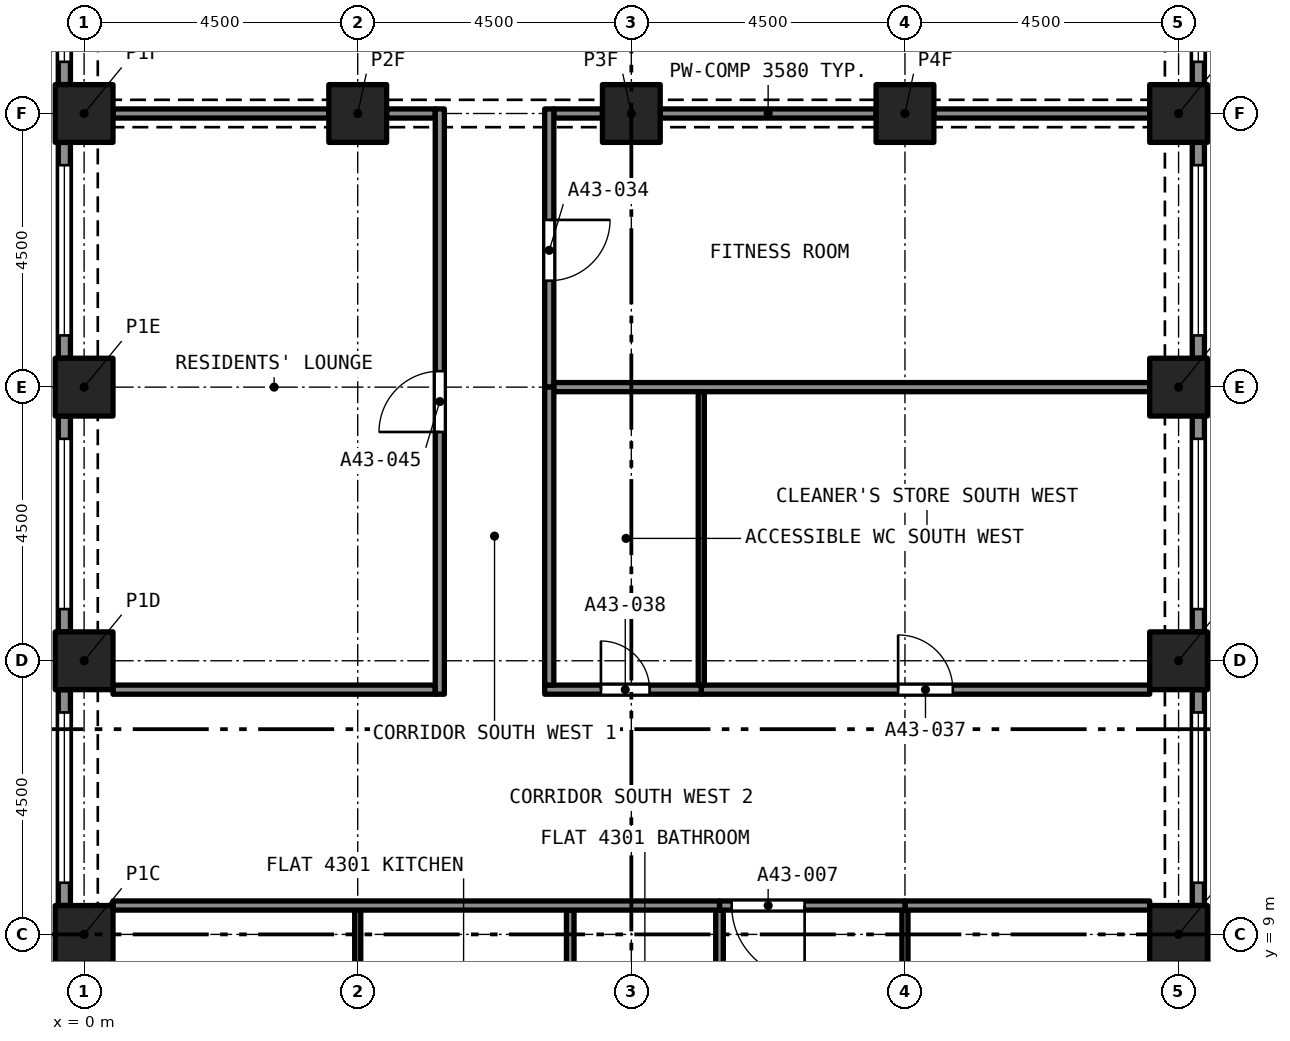
"""IFC4 building model, lengths in metres.
Left out: names, types, materials, properties, quantities, classifications, styles, units other than length and angle.
Written with IfcOpenShell. Run it as: python <this file> out.ifc"""

import sys

from ifc_helpers import new_model, si_unit, direction, frame, frame_2d, origin, origin_2d, place, context, subcontext, project, spatial, rectangle, extrude, element, fill, save


model = new_model("IFC4")
c1 = context("Model", 3, precision=1e-05, world=origin(), true_north=direction((0.0, 1.0)))
c2 = subcontext(c1, "Body", "Model", "MODEL_VIEW")
j1 = project(units=[si_unit("LENGTHUNIT", "METRE"), si_unit("PLANEANGLEUNIT", "RADIAN")], contexts=[c1])
p1 = place(None, origin())
s1 = spatial("IfcSite", under=j1, at=p1, CompositionType="ELEMENT")
p2 = place(p1, origin())
s2 = spatial("IfcBuilding", under=s1, at=p2, CompositionType="ELEMENT")
p3 = place(p2, frame((0.0, 0.0, 155.0)))
s3 = spatial("IfcBuildingStorey", under=s2, at=p3, CompositionType="ELEMENT", Elevation=155.0)
for number, where, z_axis, x_axis in (
    (1, (0.0, 9.0, 0.0), (0.0, 0.0, 1.0), (1.0, 0.0, 0.0)),
    (2, (18.0, 9.0, 0.0), (0.0, 0.0, 1.0), (1.0, 0.0, 0.0)),
    (3, (0.0, 13.5, 0.0), (0.0, 0.0, 1.0), (1.0, 0.0, 0.0)),
    (4, (18.0, 13.5, 0.0), (0.0, 0.0, 1.0), (1.0, 0.0, 0.0)),
    (5, (0.0, 18.0, 0.0), (0.0, 0.0, 1.0), (1.0, 0.0, 0.0)),
    (6, (18.0, 18.0, 0.0), (0.0, 0.0, 1.0), (1.0, 0.0, 0.0)),
    (7, (0.0, 22.5, 0.0), (0.0, 0.0, 1.0), (1.0, 0.0, 0.0)),
    (8, (4.5, 22.5, 0.0), (0.0, 0.0, 1.0), (1.0, 0.0, 0.0)),
    (9, (9.0, 22.5, 0.0), (0.0, 0.0, 1.0), (1.0, 0.0, 0.0)),
    (10, (13.5, 22.5, 0.0), (0.0, 0.0, 1.0), (1.0, 0.0, 0.0)),
    (11, (18.0, 22.5, 0.0), (0.0, 0.0, 1.0), (1.0, 0.0, 0.0)),
):
    element("IfcColumn", number, at=place(p3, frame(where, z_axis=z_axis, x_axis=x_axis)), inside=s3, PredefinedType="COLUMN", context=c2, shape_type="SweptSolid", body=[
        extrude(rectangle(XDim=0.95, YDim=0.95, at=origin_2d()), origin(), (0.0, 0.0, 1.0), 4.4),
    ])
p4 = place(p3, frame((-0.325, 22.975, 0.0), z_axis=(0.0, 0.0, 1.0), x_axis=(0.0, 1.0, 0.0)))
e12 = element("IfcWall", 12, at=p4, inside=s3, PredefinedType="SOLIDWALL", context=c2, shape_type="SweptSolid", body=[
    extrude(rectangle(XDim=3.55, YDim=0.2, at=frame_2d((1.775, 0.0))), origin(), (0.0, 0.0, 1.0), 4.4),
])
p5 = place(p4, frame((0.375, 0.0, 0.45)))
e13 = element("IfcOpeningElement", 13, at=p5, cuts=e12, PredefinedType="OPENING", context=c2, shape_type="SweptSolid", body=[
    extrude(rectangle(XDim=2.8, YDim=2.55, at=frame_2d((1.4, 1.275))), frame((0.0, 0.11, 0.0), z_axis=(0.0, -1.0, 0.0), x_axis=(1.0, 0.0, 0.0)), (0.0, 0.0, 1.0), 0.22),
])
p6 = place(p3, frame((-0.325, 18.475, 0.0), z_axis=(0.0, 0.0, 1.0), x_axis=(0.0, 1.0, 0.0)))
e14 = element("IfcWall", 14, at=p6, inside=s3, PredefinedType="SOLIDWALL", context=c2, shape_type="SweptSolid", body=[
    extrude(rectangle(XDim=3.55, YDim=0.2, at=frame_2d((1.775, 0.0))), origin(), (0.0, 0.0, 1.0), 4.4),
])
p7 = place(p6, frame((0.375, 0.0, 0.45)))
e15 = element("IfcOpeningElement", 15, at=p7, cuts=e14, PredefinedType="OPENING", context=c2, shape_type="SweptSolid", body=[
    extrude(rectangle(XDim=2.8, YDim=2.55, at=frame_2d((1.4, 1.275))), frame((0.0, 0.11, 0.0), z_axis=(0.0, -1.0, 0.0), x_axis=(1.0, 0.0, 0.0)), (0.0, 0.0, 1.0), 0.22),
])
p8 = place(p3, frame((-0.325, 13.975, 0.0), z_axis=(0.0, 0.0, 1.0), x_axis=(0.0, 1.0, 0.0)))
e16 = element("IfcWall", 16, at=p8, inside=s3, PredefinedType="SOLIDWALL", context=c2, shape_type="SweptSolid", body=[
    extrude(rectangle(XDim=3.55, YDim=0.2, at=frame_2d((1.775, 0.0))), origin(), (0.0, 0.0, 1.0), 4.4),
])
p9 = place(p8, frame((0.375, 0.0, 0.45)))
e17 = element("IfcOpeningElement", 17, at=p9, cuts=e16, PredefinedType="OPENING", context=c2, shape_type="SweptSolid", body=[
    extrude(rectangle(XDim=2.8, YDim=2.55, at=frame_2d((1.4, 1.275))), frame((0.0, 0.11, 0.0), z_axis=(0.0, -1.0, 0.0), x_axis=(1.0, 0.0, 0.0)), (0.0, 0.0, 1.0), 0.22),
])
p10 = place(p3, frame((-0.325, 9.475, 0.0), z_axis=(0.0, 0.0, 1.0), x_axis=(0.0, 1.0, 0.0)))
e18 = element("IfcWall", 18, at=p10, inside=s3, PredefinedType="SOLIDWALL", context=c2, shape_type="SweptSolid", body=[
    extrude(rectangle(XDim=3.55, YDim=0.2, at=frame_2d((1.775, 0.0))), origin(), (0.0, 0.0, 1.0), 4.4),
])
p11 = place(p10, frame((0.375, 0.0, 0.45)))
e19 = element("IfcOpeningElement", 19, at=p11, cuts=e18, PredefinedType="OPENING", context=c2, shape_type="SweptSolid", body=[
    extrude(rectangle(XDim=2.8, YDim=2.55, at=frame_2d((1.4, 1.275))), frame((0.0, 0.11, 0.0), z_axis=(0.0, -1.0, 0.0), x_axis=(1.0, 0.0, 0.0)), (0.0, 0.0, 1.0), 0.22),
])
p12 = place(p3, frame((18.325, 13.025, 0.0), z_axis=(0.0, 0.0, 1.0), x_axis=(0.0, -1.0, 0.0)))
e20 = element("IfcWall", 20, at=p12, inside=s3, PredefinedType="SOLIDWALL", context=c2, shape_type="SweptSolid", body=[
    extrude(rectangle(XDim=3.55, YDim=0.2, at=frame_2d((1.775, 0.0))), origin(), (0.0, 0.0, 1.0), 4.4),
])
p13 = place(p12, frame((0.375, 0.0, 0.45)))
e21 = element("IfcOpeningElement", 21, at=p13, cuts=e20, PredefinedType="OPENING", context=c2, shape_type="SweptSolid", body=[
    extrude(rectangle(XDim=2.8, YDim=2.55, at=frame_2d((1.4, 1.275))), frame((0.0, 0.11, 0.0), z_axis=(0.0, -1.0, 0.0), x_axis=(1.0, 0.0, 0.0)), (0.0, 0.0, 1.0), 0.22),
])
p14 = place(p3, frame((18.325, 17.525, 0.0), z_axis=(0.0, 0.0, 1.0), x_axis=(0.0, -1.0, 0.0)))
e22 = element("IfcWall", 22, at=p14, inside=s3, PredefinedType="SOLIDWALL", context=c2, shape_type="SweptSolid", body=[
    extrude(rectangle(XDim=3.55, YDim=0.2, at=frame_2d((1.775, 0.0))), origin(), (0.0, 0.0, 1.0), 4.4),
])
p15 = place(p14, frame((0.375, 0.0, 0.45)))
e23 = element("IfcOpeningElement", 23, at=p15, cuts=e22, PredefinedType="OPENING", context=c2, shape_type="SweptSolid", body=[
    extrude(rectangle(XDim=2.8, YDim=2.55, at=frame_2d((1.4, 1.275))), frame((0.0, 0.11, 0.0), z_axis=(0.0, -1.0, 0.0), x_axis=(1.0, 0.0, 0.0)), (0.0, 0.0, 1.0), 0.22),
])
p16 = place(p3, frame((18.325, 22.025, 0.0), z_axis=(0.0, 0.0, 1.0), x_axis=(0.0, -1.0, 0.0)))
e24 = element("IfcWall", 24, at=p16, inside=s3, PredefinedType="SOLIDWALL", context=c2, shape_type="SweptSolid", body=[
    extrude(rectangle(XDim=3.55, YDim=0.2, at=frame_2d((1.775, 0.0))), origin(), (0.0, 0.0, 1.0), 4.4),
])
p17 = place(p16, frame((0.375, 0.0, 0.45)))
e25 = element("IfcOpeningElement", 25, at=p17, cuts=e24, PredefinedType="OPENING", context=c2, shape_type="SweptSolid", body=[
    extrude(rectangle(XDim=2.8, YDim=2.55, at=frame_2d((1.4, 1.275))), frame((0.0, 0.11, 0.0), z_axis=(0.0, -1.0, 0.0), x_axis=(1.0, 0.0, 0.0)), (0.0, 0.0, 1.0), 0.22),
])
p18 = place(p3, frame((18.325, 26.525, 0.0), z_axis=(0.0, 0.0, 1.0), x_axis=(0.0, -1.0, 0.0)))
e26 = element("IfcWall", 26, at=p18, inside=s3, PredefinedType="SOLIDWALL", context=c2, shape_type="SweptSolid", body=[
    extrude(rectangle(XDim=3.55, YDim=0.2, at=frame_2d((1.775, 0.0))), origin(), (0.0, 0.0, 1.0), 4.4),
])
p19 = place(p18, frame((0.375, 0.0, 0.45)))
e27 = element("IfcOpeningElement", 27, at=p19, cuts=e26, PredefinedType="OPENING", context=c2, shape_type="SweptSolid", body=[
    extrude(rectangle(XDim=2.8, YDim=2.55, at=frame_2d((1.4, 1.275))), frame((0.0, 0.11, 0.0), z_axis=(0.0, -1.0, 0.0), x_axis=(1.0, 0.0, 0.0)), (0.0, 0.0, 1.0), 0.22),
])
for number, where, z_axis, x_axis in (
    (28, (10.45, 5.238, 0.0), (0.0, 0.0, 1.0), (0.0, 1.0, 0.0)),
    (29, (7.995, 5.238, 0.0), (0.0, 0.0, 1.0), (0.0, 1.0, 0.0)),
):
    element("IfcWall", number, at=place(p3, frame(where, z_axis=z_axis, x_axis=x_axis)), inside=s3, PredefinedType="PARTITIONING", context=c2, shape_type="SweptSolid", body=[
        extrude(rectangle(XDim=4.162, YDim=0.125, at=frame_2d((2.081, 0.0))), origin(), (0.0, 0.0, 1.0), 4.1),
    ])
p20 = place(p3, frame((13.5, 9.4, 0.0), z_axis=(0.0, 0.0, 1.0), x_axis=(0.0, -1.0, 0.0)))
e30 = element("IfcWall", 30, at=p20, inside=s3, PredefinedType="PARTITIONING", context=c2, shape_type="SweptSolid", body=[
    extrude(rectangle(XDim=5.565, YDim=0.1, at=frame_2d((2.782, 0.0))), origin(), (0.0, 0.0, 1.0), 4.1),
])
p21 = place(p20, frame((4.445, 0.0, 0.0)))
e31 = element("IfcOpeningElement", 31, at=p21, cuts=e30, PredefinedType="OPENING", context=c2, shape_type="SweptSolid", body=[
    extrude(rectangle(XDim=0.9, YDim=2.1, at=frame_2d((0.45, 1.05))), frame((0.0, 0.06, 0.0), z_axis=(0.0, -1.0, 0.0), x_axis=(1.0, 0.0, 0.0)), (0.0, 0.0, 1.0), 0.12),
])
p22 = place(p3, frame((13.5, 9.475, 0.0), z_axis=(0.0, 0.0, 1.0), x_axis=(1.0, 0.0, 0.0)))
e32 = element("IfcWall", 32, at=p22, inside=s3, PredefinedType="PARTITIONING", context=c2, shape_type="SweptSolid", body=[
    extrude(rectangle(XDim=4.025, YDim=0.15, at=frame_2d((2.012, 0.0))), origin(), (0.0, 0.0, 1.0), 4.1),
])
p23 = place(p3, frame((13.5, 9.475, 0.0), z_axis=(0.0, 0.0, 1.0), x_axis=(-1.0, 0.0, 0.0)))
e33 = element("IfcWall", 33, at=p23, inside=s3, PredefinedType="PARTITIONING", context=c2, shape_type="SweptSolid", body=[
    extrude(rectangle(XDim=3.05, YDim=0.15, at=frame_2d((1.525, 0.0))), origin(), (0.0, 0.0, 1.0), 4.1),
])
p24 = place(p23, frame((1.65, 0.0, 0.0)))
e34 = element("IfcOpeningElement", 34, at=p24, cuts=e33, PredefinedType="OPENING", context=c2, shape_type="SweptSolid", body=[
    extrude(rectangle(XDim=1.2, YDim=2.4, at=frame_2d((0.6, 1.2))), frame((0.0, 0.085, 0.0), z_axis=(0.0, -1.0, 0.0), x_axis=(1.0, 0.0, 0.0)), (0.0, 0.0, 1.0), 0.17),
])
p25 = place(p3, frame((4.5, 5.175, 0.0), z_axis=(0.0, 0.0, 1.0), x_axis=(0.0, 1.0, 0.0)))
e35 = element("IfcWall", 35, at=p25, inside=s3, PredefinedType="PARTITIONING", context=c2, shape_type="SweptSolid", body=[
    extrude(rectangle(XDim=4.225, YDim=0.1, at=frame_2d((2.112, 0.0))), origin(), (0.0, 0.0, 1.0), 4.1),
])
p26 = place(p3, frame((0.475, 9.475, 0.0), z_axis=(0.0, 0.0, 1.0), x_axis=(1.0, 0.0, 0.0)))
e36 = element("IfcWall", 36, at=p26, inside=s3, PredefinedType="PARTITIONING", context=c2, shape_type="SweptSolid", body=[
    extrude(rectangle(XDim=9.975, YDim=0.15, at=frame_2d((4.987, 0.0))), origin(), (0.0, 0.0, 1.0), 4.1),
])
p27 = place(p3, frame((7.725, 22.5, 0.0), z_axis=(0.0, 0.0, 1.0), x_axis=(1.0, 0.0, 0.0)))
e37 = element("IfcWall", 37, at=p27, inside=s3, PredefinedType="PARTITIONING", context=c2, shape_type="SweptSolid", body=[
    extrude(rectangle(XDim=0.8, YDim=0.15, at=frame_2d((0.4, 0.0))), origin(), (0.0, 0.0, 1.0), 3.58),
])
for number, where, z_axis, x_axis in (
    (38, (9.475, 22.5, 0.0), (0.0, 0.0, 1.0), (1.0, 0.0, 0.0)),
    (39, (13.975, 22.5, 0.0), (0.0, 0.0, 1.0), (1.0, 0.0, 0.0)),
):
    element("IfcWall", number, at=place(p3, frame(where, z_axis=z_axis, x_axis=x_axis)), inside=s3, PredefinedType="PARTITIONING", context=c2, shape_type="SweptSolid", body=[
        extrude(rectangle(XDim=3.55, YDim=0.15, at=frame_2d((1.775, 0.0))), origin(), (0.0, 0.0, 1.0), 3.58),
    ])
p28 = place(p3, frame((7.65, 22.575, 0.0), z_axis=(0.0, 0.0, 1.0), x_axis=(0.0, -1.0, 0.0)))
e40 = element("IfcWall", 40, at=p28, inside=s3, PredefinedType="PARTITIONING", context=c2, shape_type="SweptSolid", body=[
    extrude(rectangle(XDim=4.575, YDim=0.15, at=frame_2d((2.288, 0.0))), origin(), (0.0, 0.0, 1.0), 4.1),
])
p29 = place(p28, frame((1.825, 0.0, 0.0)))
e41 = element("IfcOpeningElement", 41, at=p29, cuts=e40, PredefinedType="OPENING", context=c2, shape_type="SweptSolid", body=[
    extrude(rectangle(XDim=1.0, YDim=2.1, at=frame_2d((0.5, 1.05))), frame((0.0, 0.085, 0.0), z_axis=(0.0, -1.0, 0.0), x_axis=(1.0, 0.0, 0.0)), (0.0, 0.0, 1.0), 0.17),
])
p30 = place(p3, frame((7.725, 18.0, 0.0), z_axis=(0.0, 0.0, 1.0), x_axis=(1.0, 0.0, 0.0)))
e42 = element("IfcWall", 42, at=p30, inside=s3, PredefinedType="PARTITIONING", context=c2, shape_type="SweptSolid", body=[
    extrude(rectangle(XDim=9.8, YDim=0.15, at=frame_2d((4.9, 0.0))), origin(), (0.0, 0.0, 1.0), 4.1),
])
p31 = place(p3, frame((10.15, 13.025, 0.0), z_axis=(0.0, 0.0, 1.0), x_axis=(1.0, 0.0, 0.0)))
e43 = element("IfcWall", 43, at=p31, inside=s3, PredefinedType="PARTITIONING", context=c2, shape_type="SweptSolid", body=[
    extrude(rectangle(XDim=7.375, YDim=0.15, at=frame_2d((3.688, 0.0))), origin(), (0.0, 0.0, 1.0), 4.1),
])
p32 = place(p31, frame((3.238, 0.0, 0.0)))
e44 = element("IfcOpeningElement", 44, at=p32, cuts=e43, PredefinedType="OPENING", context=c2, shape_type="SweptSolid", body=[
    extrude(rectangle(XDim=0.9, YDim=2.1, at=frame_2d((0.45, 1.05))), frame((0.0, 0.085, 0.0), z_axis=(0.0, -1.0, 0.0), x_axis=(1.0, 0.0, 0.0)), (0.0, 0.0, 1.0), 0.17),
])
p33 = place(p3, frame((7.575, 13.025, 0.0), z_axis=(0.0, 0.0, 1.0), x_axis=(1.0, 0.0, 0.0)))
e45 = element("IfcWall", 45, at=p33, inside=s3, PredefinedType="PARTITIONING", context=c2, shape_type="SweptSolid", body=[
    extrude(rectangle(XDim=2.575, YDim=0.15, at=frame_2d((1.288, 0.0))), origin(), (0.0, 0.0, 1.0), 4.1),
])
p34 = place(p33, frame((0.925, 0.0, 0.0)))
e46 = element("IfcOpeningElement", 46, at=p34, cuts=e45, PredefinedType="OPENING", context=c2, shape_type="SweptSolid", body=[
    extrude(rectangle(XDim=0.8, YDim=2.1, at=frame_2d((0.4, 1.05))), frame((0.0, 0.085, 0.0), z_axis=(0.0, -1.0, 0.0), x_axis=(1.0, 0.0, 0.0)), (0.0, 0.0, 1.0), 0.17),
])
p35 = place(p3, frame((0.475, 13.025, 0.0), z_axis=(0.0, 0.0, 1.0), x_axis=(1.0, 0.0, 0.0)))
e47 = element("IfcWall", 47, at=p35, inside=s3, PredefinedType="PARTITIONING", context=c2, shape_type="SweptSolid", body=[
    extrude(rectangle(XDim=5.3, YDim=0.15, at=frame_2d((2.65, 0.0))), origin(), (0.0, 0.0, 1.0), 4.1),
])
p36 = place(p3, frame((4.975, 22.5, 0.0), z_axis=(0.0, 0.0, 1.0), x_axis=(1.0, 0.0, 0.0)))
e48 = element("IfcWall", 48, at=p36, inside=s3, PredefinedType="PARTITIONING", context=c2, shape_type="SweptSolid", body=[
    extrude(rectangle(XDim=0.8, YDim=0.15, at=frame_2d((0.4, 0.0))), origin(), (0.0, 0.0, 1.0), 3.58),
])
p37 = place(p3, frame((0.475, 22.5, 0.0), z_axis=(0.0, 0.0, 1.0), x_axis=(1.0, 0.0, 0.0)))
e49 = element("IfcWall", 49, at=p37, inside=s3, PredefinedType="PARTITIONING", context=c2, shape_type="SweptSolid", body=[
    extrude(rectangle(XDim=3.55, YDim=0.15, at=frame_2d((1.775, 0.0))), origin(), (0.0, 0.0, 1.0), 3.58),
])
p38 = place(p3, frame((7.65, 13.1, 0.0), z_axis=(0.0, 0.0, 1.0), x_axis=(0.0, 1.0, 0.0)))
e50 = element("IfcWall", 50, at=p38, inside=s3, PredefinedType="PARTITIONING", context=c2, shape_type="SweptSolid", body=[
    extrude(rectangle(XDim=4.9, YDim=0.15, at=frame_2d((2.45, 0.0))), origin(), (0.0, 0.0, 1.0), 4.1),
])
p39 = place(p3, frame((5.85, 12.95, 0.0), z_axis=(0.0, 0.0, 1.0), x_axis=(0.0, 1.0, 0.0)))
e51 = element("IfcWall", 51, at=p39, inside=s3, PredefinedType="PARTITIONING", context=c2, shape_type="SweptSolid", body=[
    extrude(rectangle(XDim=9.625, YDim=0.15, at=frame_2d((4.812, 0.0))), origin(), (0.0, 0.0, 1.0), 4.1),
])
p40 = place(p39, frame((4.312, 0.0, 0.0)))
e52 = element("IfcOpeningElement", 52, at=p40, cuts=e51, PredefinedType="OPENING", context=c2, shape_type="SweptSolid", body=[
    extrude(rectangle(XDim=1.0, YDim=2.1, at=frame_2d((0.5, 1.05))), frame((0.0, 0.085, 0.0), z_axis=(0.0, -1.0, 0.0), x_axis=(1.0, 0.0, 0.0)), (0.0, 0.0, 1.0), 0.17),
])
p41 = place(p3, frame((10.15, 13.1, 0.0), z_axis=(0.0, 0.0, 1.0), x_axis=(0.0, 1.0, 0.0)))
e53 = element("IfcWall", 53, at=p41, inside=s3, PredefinedType="PARTITIONING", context=c2, shape_type="SweptSolid", body=[
    extrude(rectangle(XDim=4.825, YDim=0.1, at=frame_2d((2.413, 0.0))), origin(), (0.0, 0.0, 1.0), 4.1),
])
p42 = place(p5, origin())
e54 = element("IfcWindow", 54, at=p42, inside=s3, PartitioningType="SINGLE_PANEL", PredefinedType="WINDOW", context=c2, shape_type="SweptSolid", body=[
    extrude(rectangle(XDim=2.8, YDim=2.55, at=frame_2d((1.4, 1.275))), frame((0.0, 0.03, 0.0), z_axis=(0.0, -1.0, 0.0), x_axis=(1.0, 0.0, 0.0)), (0.0, 0.0, 1.0), 0.06),
])
fill(e13, e54)
p43 = place(p7, origin())
e55 = element("IfcWindow", 55, at=p43, inside=s3, PartitioningType="SINGLE_PANEL", PredefinedType="WINDOW", context=c2, shape_type="SweptSolid", body=[
    extrude(rectangle(XDim=2.8, YDim=2.55, at=frame_2d((1.4, 1.275))), frame((0.0, 0.03, 0.0), z_axis=(0.0, -1.0, 0.0), x_axis=(1.0, 0.0, 0.0)), (0.0, 0.0, 1.0), 0.06),
])
fill(e15, e55)
p44 = place(p9, origin())
e56 = element("IfcWindow", 56, at=p44, inside=s3, PartitioningType="SINGLE_PANEL", PredefinedType="WINDOW", context=c2, shape_type="SweptSolid", body=[
    extrude(rectangle(XDim=2.8, YDim=2.55, at=frame_2d((1.4, 1.275))), frame((0.0, 0.03, 0.0), z_axis=(0.0, -1.0, 0.0), x_axis=(1.0, 0.0, 0.0)), (0.0, 0.0, 1.0), 0.06),
])
fill(e17, e56)
p45 = place(p11, origin())
e57 = element("IfcWindow", 57, at=p45, inside=s3, PartitioningType="SINGLE_PANEL", PredefinedType="WINDOW", context=c2, shape_type="SweptSolid", body=[
    extrude(rectangle(XDim=2.8, YDim=2.55, at=frame_2d((1.4, 1.275))), frame((0.0, 0.03, 0.0), z_axis=(0.0, -1.0, 0.0), x_axis=(1.0, 0.0, 0.0)), (0.0, 0.0, 1.0), 0.06),
])
fill(e19, e57)
p46 = place(p13, origin())
e58 = element("IfcWindow", 58, at=p46, inside=s3, PartitioningType="SINGLE_PANEL", PredefinedType="WINDOW", context=c2, shape_type="SweptSolid", body=[
    extrude(rectangle(XDim=2.8, YDim=2.55, at=frame_2d((1.4, 1.275))), frame((0.0, 0.03, 0.0), z_axis=(0.0, -1.0, 0.0), x_axis=(1.0, 0.0, 0.0)), (0.0, 0.0, 1.0), 0.06),
])
fill(e21, e58)
p47 = place(p15, origin())
e59 = element("IfcWindow", 59, at=p47, inside=s3, PartitioningType="SINGLE_PANEL", PredefinedType="WINDOW", context=c2, shape_type="SweptSolid", body=[
    extrude(rectangle(XDim=2.8, YDim=2.55, at=frame_2d((1.4, 1.275))), frame((0.0, 0.03, 0.0), z_axis=(0.0, -1.0, 0.0), x_axis=(1.0, 0.0, 0.0)), (0.0, 0.0, 1.0), 0.06),
])
fill(e23, e59)
p48 = place(p17, origin())
e60 = element("IfcWindow", 60, at=p48, inside=s3, PartitioningType="SINGLE_PANEL", PredefinedType="WINDOW", context=c2, shape_type="SweptSolid", body=[
    extrude(rectangle(XDim=2.8, YDim=2.55, at=frame_2d((1.4, 1.275))), frame((0.0, 0.03, 0.0), z_axis=(0.0, -1.0, 0.0), x_axis=(1.0, 0.0, 0.0)), (0.0, 0.0, 1.0), 0.06),
])
fill(e25, e60)
p49 = place(p19, origin())
e61 = element("IfcWindow", 61, at=p49, inside=s3, PartitioningType="SINGLE_PANEL", PredefinedType="WINDOW", context=c2, shape_type="SweptSolid", body=[
    extrude(rectangle(XDim=2.8, YDim=2.55, at=frame_2d((1.4, 1.275))), frame((0.0, 0.03, 0.0), z_axis=(0.0, -1.0, 0.0), x_axis=(1.0, 0.0, 0.0)), (0.0, 0.0, 1.0), 0.06),
])
fill(e27, e61)
p50 = place(p24, origin())
e62 = element("IfcDoor", 62, at=p50, inside=s3, OperationType="SINGLE_SWING_RIGHT", PredefinedType="DOOR", context=c2, shape_type="SweptSolid", body=[
    extrude(rectangle(XDim=1.2, YDim=2.4, at=frame_2d((0.6, 1.2))), frame((0.0, 0.025, 0.0), z_axis=(0.0, -1.0, 0.0), x_axis=(1.0, 0.0, 0.0)), (0.0, 0.0, 1.0), 0.05),
])
fill(e34, e62)
p51 = place(p29, origin())
e63 = element("IfcDoor", 63, at=p51, inside=s3, OperationType="SINGLE_SWING_RIGHT", PredefinedType="DOOR", context=c2, shape_type="SweptSolid", body=[
    extrude(rectangle(XDim=1.0, YDim=2.1, at=frame_2d((0.5, 1.05))), frame((0.0, 0.025, 0.0), z_axis=(0.0, -1.0, 0.0), x_axis=(1.0, 0.0, 0.0)), (0.0, 0.0, 1.0), 0.05),
])
fill(e41, e63)
p52 = place(p32, origin())
e64 = element("IfcDoor", 64, at=p52, inside=s3, OperationType="SINGLE_SWING_LEFT", PredefinedType="DOOR", context=c2, shape_type="SweptSolid", body=[
    extrude(rectangle(XDim=0.9, YDim=2.1, at=frame_2d((0.45, 1.05))), frame((0.0, 0.025, 0.0), z_axis=(0.0, -1.0, 0.0), x_axis=(1.0, 0.0, 0.0)), (0.0, 0.0, 1.0), 0.05),
])
fill(e44, e64)
p53 = place(p34, origin())
e65 = element("IfcDoor", 65, at=p53, inside=s3, OperationType="SINGLE_SWING_RIGHT", PredefinedType="DOOR", context=c2, shape_type="SweptSolid", body=[
    extrude(rectangle(XDim=0.8, YDim=2.1, at=frame_2d((0.4, 1.05))), frame((0.0, 0.025, 0.0), z_axis=(0.0, -1.0, 0.0), x_axis=(1.0, 0.0, 0.0)), (0.0, 0.0, 1.0), 0.05),
])
fill(e46, e65)
p54 = place(p40, origin())
e66 = element("IfcDoor", 66, at=p54, inside=s3, OperationType="SINGLE_SWING_RIGHT", PredefinedType="DOOR", context=c2, shape_type="SweptSolid", body=[
    extrude(rectangle(XDim=1.0, YDim=2.1, at=frame_2d((0.5, 1.05))), frame((0.0, 0.025, 0.0), z_axis=(0.0, -1.0, 0.0), x_axis=(1.0, 0.0, 0.0)), (0.0, 0.0, 1.0), 0.05),
])
fill(e52, e66)
save(model, sys.argv[1])
